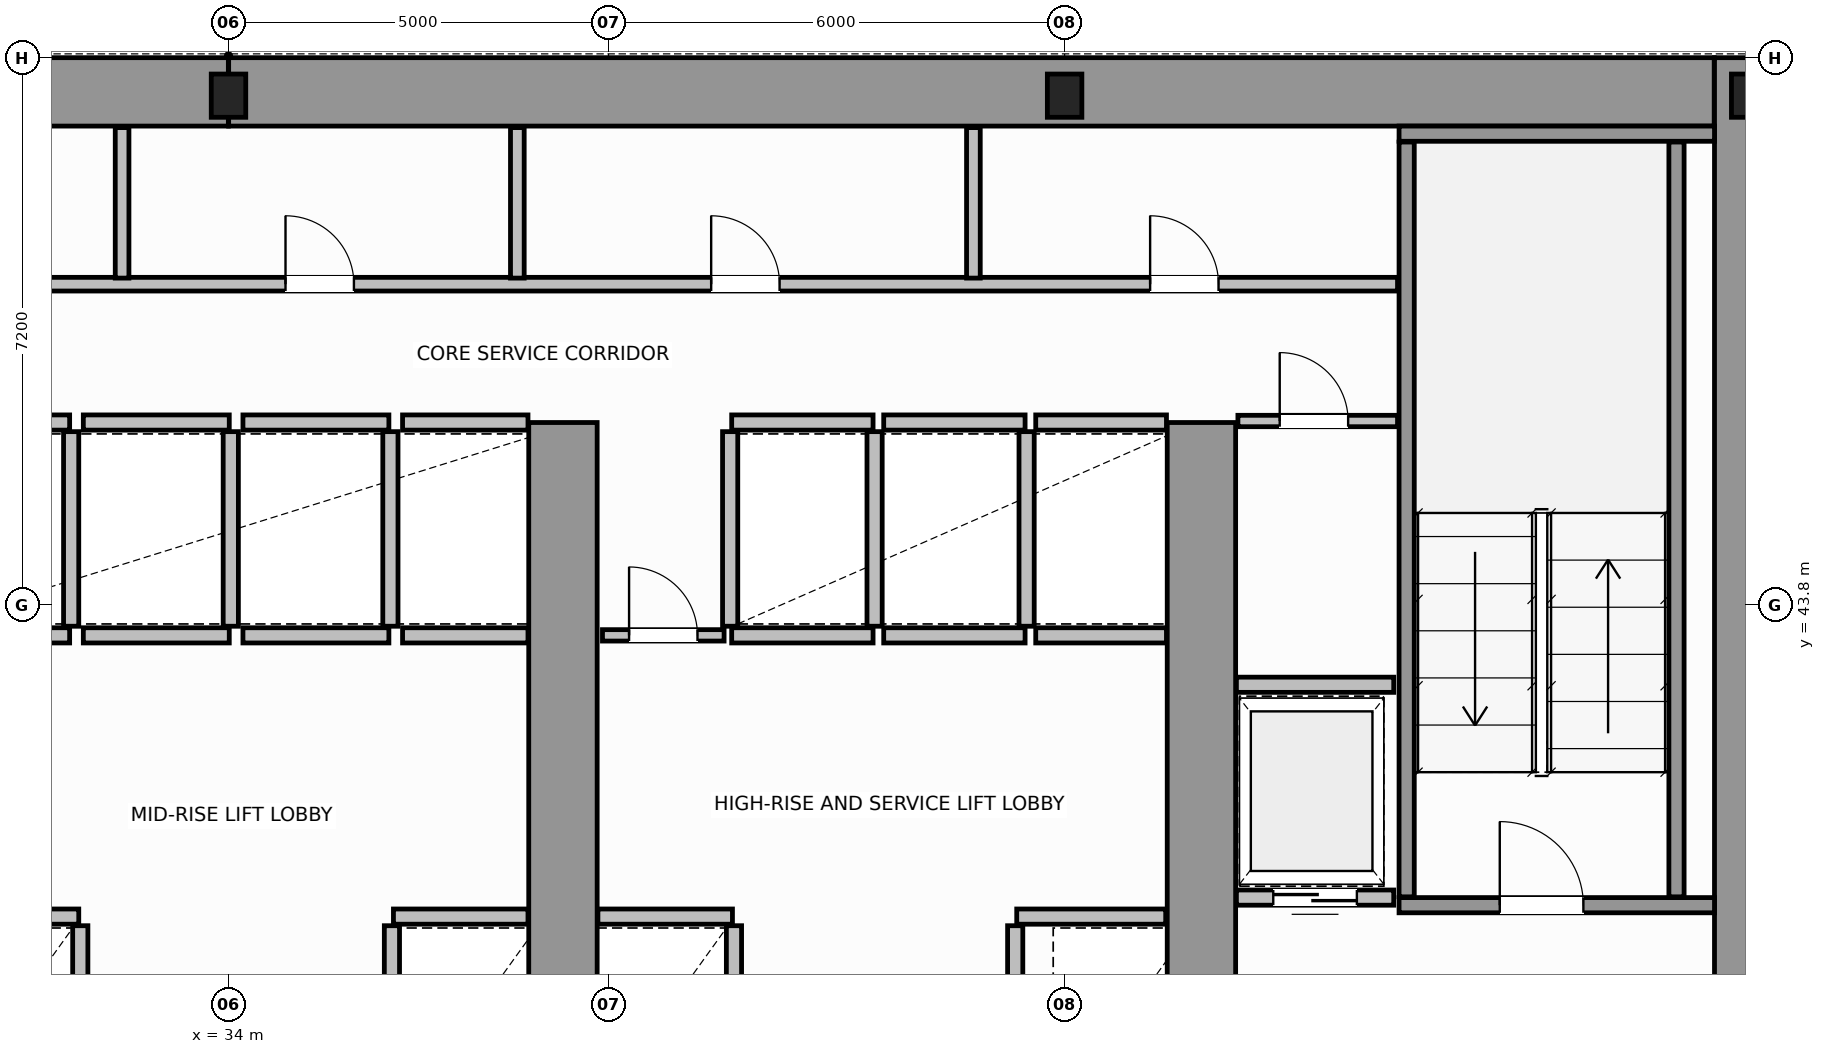
"""IFC4 building model, lengths in metres.
Left out: names, types, materials, properties, quantities, classifications, styles, units other than length and angle.
Written with IfcOpenShell. Run it as: python <this file> out.ifc"""

import sys

from ifc_helpers import new_model, si_unit, direction, frame, frame_2d, origin, origin_2d, place, context, subcontext, project, spatial, rectangle, i_section, extrude, source, transform, mapped, element, fill, save


model = new_model("IFC4")
c1 = context("Model", 3, precision=1e-05, world=origin(), true_north=direction((0.0, 1.0)))
c2 = subcontext(c1, "Body", "Model", "MODEL_VIEW")
j1 = project(units=[si_unit("LENGTHUNIT", "METRE"), si_unit("PLANEANGLEUNIT", "RADIAN")], contexts=[c1])
p1 = place(None, origin())
s1 = spatial("IfcSite", under=j1, at=p1, CompositionType="ELEMENT")
p2 = place(p1, origin())
s2 = spatial("IfcBuilding", under=s1, at=p2, CompositionType="ELEMENT")
p3 = place(p2, frame((0.0, 0.0, 49.2)))
s3 = spatial("IfcBuildingStorey", under=s2, at=p3, CompositionType="ELEMENT", Elevation=49.2)
m1 = source(origin(), c2, "Body", "SweptSolid", [
    extrude(i_section(OverallWidth=0.454, OverallDepth=0.569, WebThickness=0.078, FlangeThickness=0.08, FilletRadius=0.015, at=origin_2d()), origin(), (0.0, 0.0, 1.0), 3.8),
])
for number, where, z_axis, x_axis in (
    (1, (34.0, 50.5, 0.0), (0.0, 0.0, 1.0), (1.0, 0.0, 0.0)),
    (2, (45.0, 50.5, 0.0), (0.0, 0.0, 1.0), (1.0, 0.0, 0.0)),
    (3, (54.0, 50.5, 0.0), (0.0, 0.0, 1.0), (1.0, 0.0, 0.0)),
):
    element("IfcColumn", number, at=place(p3, frame(where, z_axis=z_axis, x_axis=x_axis)), inside=s3, PredefinedType="COLUMN", context=c2, shape_type="MappedRepresentation", body=[
        mapped(m1, transform((0.0, 0.0, 0.0), scale=1.0)),
    ])
for number, where, z_axis, x_axis in (
    (4, (14.454, 50.55, 0.0), (0.0, 0.0, 1.0), (1.0, 0.0, 0.0)),
    (5, (34.002, 50.55, 0.0), (0.0, 0.0, 1.0), (1.0, 0.0, 0.0)),
):
    element("IfcWall", number, at=place(p3, frame(where, z_axis=z_axis, x_axis=x_axis)), inside=s3, PredefinedType="SHEAR", context=c2, shape_type="SweptSolid", body=[
        extrude(rectangle(XDim=19.544, YDim=0.9, at=frame_2d((9.772, 0.0))), origin(), (0.0, 0.0, 1.0), 3.8),
    ])
p4 = place(p3, frame((54.0, 36.5, 0.0), z_axis=(0.0, 0.0, 1.0), x_axis=(0.0, 1.0, 0.0)))
e6 = element("IfcWall", 6, at=p4, inside=s3, PredefinedType="SHEAR", context=c2, shape_type="SweptSolid", body=[
    extrude(rectangle(XDim=14.5, YDim=0.9, at=frame_2d((7.25, 0.0))), origin(), (0.0, 0.0, 1.0), 3.8),
])
for number, where, z_axis, x_axis in (
    (7, (38.4, 36.97, 0.0), (0.0, 0.0, 1.0), (0.0, 1.0, 0.0)),
    (8, (46.8, 36.97, 0.0), (0.0, 0.0, 1.0), (0.0, 1.0, 0.0)),
):
    element("IfcWall", number, at=place(p3, frame(where, z_axis=z_axis, x_axis=x_axis)), inside=s3, PredefinedType="SHEAR", context=c2, shape_type="SweptSolid", body=[
        extrude(rectangle(XDim=9.23, YDim=0.9, at=frame_2d((4.615, 0.0))), origin(), (0.0, 0.0, 1.0), 3.8),
    ])
p5 = place(p3, frame((49.4, 39.85, 0.0), z_axis=(0.0, 0.0, 1.0), x_axis=(1.0, 0.0, 0.0)))
e9 = element("IfcWall", 9, at=p5, inside=s3, PredefinedType="SOLIDWALL", context=c2, shape_type="SweptSolid", body=[
    extrude(rectangle(XDim=4.15, YDim=0.2, at=frame_2d((2.075, 0.0))), origin(), (0.0, 0.0, 1.0), 3.8),
])
p6 = place(p5, frame((1.325, 0.0, 0.0)))
e10 = element("IfcOpeningElement", 10, at=p6, cuts=e9, PredefinedType="OPENING", context=c2, shape_type="SweptSolid", body=[
    extrude(rectangle(XDim=1.1, YDim=2.15, at=frame_2d((0.55, 1.075))), frame((0.0, 0.11, 0.0), z_axis=(0.0, -1.0, 0.0), x_axis=(1.0, 0.0, 0.0)), (0.0, 0.0, 1.0), 0.22),
])
p7 = place(p3, frame((49.4, 50.0, 0.0), z_axis=(0.0, 0.0, 1.0), x_axis=(1.0, 0.0, 0.0)))
e11 = element("IfcWall", 11, at=p7, inside=s3, PredefinedType="SOLIDWALL", context=c2, shape_type="SweptSolid", body=[
    extrude(rectangle(XDim=4.15, YDim=0.2, at=frame_2d((2.075, 0.0))), origin(), (0.0, 0.0, 1.0), 3.8),
])
for number, where, z_axis, x_axis in (
    (12, (49.5, 39.96, 0.0), (0.0, 0.0, 1.0), (0.0, 1.0, 0.0)),
    (13, (53.05, 39.96, 0.0), (0.0, 0.0, 1.0), (0.0, 1.0, 0.0)),
):
    element("IfcWall", number, at=place(p3, frame(where, z_axis=z_axis, x_axis=x_axis)), inside=s3, PredefinedType="SOLIDWALL", context=c2, shape_type="SweptSolid", body=[
        extrude(rectangle(XDim=9.93, YDim=0.2, at=frame_2d((4.965, 0.0))), origin(), (0.0, 0.0, 1.0), 3.8),
    ])
p8 = place(p3, frame((30.26, 39.7, 0.0), z_axis=(0.0, 0.0, 1.0), x_axis=(1.0, 0.0, 0.0)))
e14 = element("IfcWall", 14, at=p8, inside=s3, PredefinedType="SOLIDWALL", context=c2, shape_type="SweptSolid", body=[
    extrude(rectangle(XDim=1.77, YDim=0.2, at=frame_2d((0.885, 0.0))), origin(), (0.0, 0.0, 1.0), 3.58),
])
p9 = place(p3, frame((32.05, 37.02, 0.0), z_axis=(0.0, 0.0, 1.0), x_axis=(0.0, 1.0, 0.0)))
e15 = element("IfcWall", 15, at=p9, inside=s3, PredefinedType="SOLIDWALL", context=c2, shape_type="SweptSolid", body=[
    extrude(rectangle(XDim=2.56, YDim=0.2, at=frame_2d((1.28, 0.0))), origin(), (0.0, 0.0, 1.0), 3.58),
])
p10 = place(p3, frame((36.17, 39.7, 0.0), z_axis=(0.0, 0.0, 1.0), x_axis=(1.0, 0.0, 0.0)))
e16 = element("IfcWall", 16, at=p10, inside=s3, PredefinedType="SOLIDWALL", context=c2, shape_type="SweptSolid", body=[
    extrude(rectangle(XDim=1.77, YDim=0.2, at=frame_2d((0.885, 0.0))), origin(), (0.0, 0.0, 1.0), 3.58),
])
p11 = place(p3, frame((36.15, 37.02, 0.0), z_axis=(0.0, 0.0, 1.0), x_axis=(0.0, 1.0, 0.0)))
e17 = element("IfcWall", 17, at=p11, inside=s3, PredefinedType="SOLIDWALL", context=c2, shape_type="SweptSolid", body=[
    extrude(rectangle(XDim=2.56, YDim=0.2, at=frame_2d((1.28, 0.0))), origin(), (0.0, 0.0, 1.0), 3.58),
])
for number, where, z_axis, x_axis in (
    (18, (30.26, 43.4, 0.0), (0.0, 0.0, 1.0), (1.0, 0.0, 0.0)),
    (19, (30.26, 46.2, 0.0), (0.0, 0.0, 1.0), (1.0, 0.0, 0.0)),
):
    element("IfcWall", number, at=place(p3, frame(where, z_axis=z_axis, x_axis=x_axis)), inside=s3, PredefinedType="SOLIDWALL", context=c2, shape_type="SweptSolid", body=[
        extrude(rectangle(XDim=1.65, YDim=0.2, at=frame_2d((0.825, 0.0))), origin(), (0.0, 0.0, 1.0), 3.58),
    ])
p12 = place(p3, frame((31.93, 43.52, 0.0), z_axis=(0.0, 0.0, 1.0), x_axis=(0.0, 1.0, 0.0)))
e20 = element("IfcWall", 20, at=p12, inside=s3, PredefinedType="SOLIDWALL", context=c2, shape_type="SweptSolid", body=[
    extrude(rectangle(XDim=2.56, YDim=0.2, at=frame_2d((1.28, 0.0))), origin(), (0.0, 0.0, 1.0), 3.58),
])
for number, where, z_axis, x_axis in (
    (21, (32.09, 43.4, 0.0), (0.0, 0.0, 1.0), (1.0, 0.0, 0.0)),
    (22, (32.09, 46.2, 0.0), (0.0, 0.0, 1.0), (1.0, 0.0, 0.0)),
):
    element("IfcWall", number, at=place(p3, frame(where, z_axis=z_axis, x_axis=x_axis)), inside=s3, PredefinedType="SOLIDWALL", context=c2, shape_type="SweptSolid", body=[
        extrude(rectangle(XDim=1.92, YDim=0.2, at=frame_2d((0.96, 0.0))), origin(), (0.0, 0.0, 1.0), 3.58),
    ])
p13 = place(p3, frame((34.03, 43.52, 0.0), z_axis=(0.0, 0.0, 1.0), x_axis=(0.0, 1.0, 0.0)))
e23 = element("IfcWall", 23, at=p13, inside=s3, PredefinedType="SOLIDWALL", context=c2, shape_type="SweptSolid", body=[
    extrude(rectangle(XDim=2.56, YDim=0.2, at=frame_2d((1.28, 0.0))), origin(), (0.0, 0.0, 1.0), 3.58),
])
for number, where, z_axis, x_axis in (
    (24, (34.19, 43.4, 0.0), (0.0, 0.0, 1.0), (1.0, 0.0, 0.0)),
    (25, (34.19, 46.2, 0.0), (0.0, 0.0, 1.0), (1.0, 0.0, 0.0)),
):
    element("IfcWall", number, at=place(p3, frame(where, z_axis=z_axis, x_axis=x_axis)), inside=s3, PredefinedType="SOLIDWALL", context=c2, shape_type="SweptSolid", body=[
        extrude(rectangle(XDim=1.92, YDim=0.2, at=frame_2d((0.96, 0.0))), origin(), (0.0, 0.0, 1.0), 3.58),
    ])
p14 = place(p3, frame((36.13, 43.52, 0.0), z_axis=(0.0, 0.0, 1.0), x_axis=(0.0, 1.0, 0.0)))
e26 = element("IfcWall", 26, at=p14, inside=s3, PredefinedType="SOLIDWALL", context=c2, shape_type="SweptSolid", body=[
    extrude(rectangle(XDim=2.56, YDim=0.2, at=frame_2d((1.28, 0.0))), origin(), (0.0, 0.0, 1.0), 3.58),
])
for number, where, z_axis, x_axis in (
    (27, (36.29, 43.4, 0.0), (0.0, 0.0, 1.0), (1.0, 0.0, 0.0)),
    (28, (36.29, 46.2, 0.0), (0.0, 0.0, 1.0), (1.0, 0.0, 0.0)),
):
    element("IfcWall", number, at=place(p3, frame(where, z_axis=z_axis, x_axis=x_axis)), inside=s3, PredefinedType="SOLIDWALL", context=c2, shape_type="SweptSolid", body=[
        extrude(rectangle(XDim=1.65, YDim=0.2, at=frame_2d((0.825, 0.0))), origin(), (0.0, 0.0, 1.0), 3.58),
    ])
p15 = place(p3, frame((38.86, 39.7, 0.0), z_axis=(0.0, 0.0, 1.0), x_axis=(1.0, 0.0, 0.0)))
e29 = element("IfcWall", 29, at=p15, inside=s3, PredefinedType="SOLIDWALL", context=c2, shape_type="SweptSolid", body=[
    extrude(rectangle(XDim=1.77, YDim=0.2, at=frame_2d((0.885, 0.0))), origin(), (0.0, 0.0, 1.0), 3.58),
])
p16 = place(p3, frame((40.65, 37.02, 0.0), z_axis=(0.0, 0.0, 1.0), x_axis=(0.0, 1.0, 0.0)))
e30 = element("IfcWall", 30, at=p16, inside=s3, PredefinedType="SOLIDWALL", context=c2, shape_type="SweptSolid", body=[
    extrude(rectangle(XDim=2.56, YDim=0.2, at=frame_2d((1.28, 0.0))), origin(), (0.0, 0.0, 1.0), 3.58),
])
p17 = place(p3, frame((44.37, 39.7, 0.0), z_axis=(0.0, 0.0, 1.0), x_axis=(1.0, 0.0, 0.0)))
e31 = element("IfcWall", 31, at=p17, inside=s3, PredefinedType="SOLIDWALL", context=c2, shape_type="SweptSolid", body=[
    extrude(rectangle(XDim=1.96, YDim=0.2, at=frame_2d((0.98, 0.0))), origin(), (0.0, 0.0, 1.0), 3.58),
])
p18 = place(p3, frame((44.35, 37.02, 0.0), z_axis=(0.0, 0.0, 1.0), x_axis=(0.0, 1.0, 0.0)))
e32 = element("IfcWall", 32, at=p18, inside=s3, PredefinedType="SOLIDWALL", context=c2, shape_type="SweptSolid", body=[
    extrude(rectangle(XDim=2.56, YDim=0.2, at=frame_2d((1.28, 0.0))), origin(), (0.0, 0.0, 1.0), 3.58),
])
for number, where, z_axis, x_axis in (
    (33, (40.62, 43.4, 0.0), (0.0, 0.0, 1.0), (1.0, 0.0, 0.0)),
    (34, (40.62, 46.2, 0.0), (0.0, 0.0, 1.0), (1.0, 0.0, 0.0)),
):
    element("IfcWall", number, at=place(p3, frame(where, z_axis=z_axis, x_axis=x_axis)), inside=s3, PredefinedType="SOLIDWALL", context=c2, shape_type="SweptSolid", body=[
        extrude(rectangle(XDim=1.86, YDim=0.2, at=frame_2d((0.93, 0.0))), origin(), (0.0, 0.0, 1.0), 3.58),
    ])
for number, where, z_axis, x_axis in (
    (35, (40.6, 43.52, 0.0), (0.0, 0.0, 1.0), (0.0, 1.0, 0.0)),
    (36, (42.5, 43.52, 0.0), (0.0, 0.0, 1.0), (0.0, 1.0, 0.0)),
):
    element("IfcWall", number, at=place(p3, frame(where, z_axis=z_axis, x_axis=x_axis)), inside=s3, PredefinedType="SOLIDWALL", context=c2, shape_type="SweptSolid", body=[
        extrude(rectangle(XDim=2.56, YDim=0.2, at=frame_2d((1.28, 0.0))), origin(), (0.0, 0.0, 1.0), 3.58),
    ])
for number, where, z_axis, x_axis in (
    (37, (42.62, 43.4, 0.0), (0.0, 0.0, 1.0), (1.0, 0.0, 0.0)),
    (38, (42.62, 46.2, 0.0), (0.0, 0.0, 1.0), (1.0, 0.0, 0.0)),
):
    element("IfcWall", number, at=place(p3, frame(where, z_axis=z_axis, x_axis=x_axis)), inside=s3, PredefinedType="SOLIDWALL", context=c2, shape_type="SweptSolid", body=[
        extrude(rectangle(XDim=1.86, YDim=0.2, at=frame_2d((0.93, 0.0))), origin(), (0.0, 0.0, 1.0), 3.58),
    ])
p19 = place(p3, frame((44.5, 43.52, 0.0), z_axis=(0.0, 0.0, 1.0), x_axis=(0.0, 1.0, 0.0)))
e39 = element("IfcWall", 39, at=p19, inside=s3, PredefinedType="SOLIDWALL", context=c2, shape_type="SweptSolid", body=[
    extrude(rectangle(XDim=2.56, YDim=0.2, at=frame_2d((1.28, 0.0))), origin(), (0.0, 0.0, 1.0), 3.58),
])
for number, where, z_axis, x_axis in (
    (40, (44.62, 43.4, 0.0), (0.0, 0.0, 1.0), (1.0, 0.0, 0.0)),
    (41, (44.62, 46.2, 0.0), (0.0, 0.0, 1.0), (1.0, 0.0, 0.0)),
):
    element("IfcWall", number, at=place(p3, frame(where, z_axis=z_axis, x_axis=x_axis)), inside=s3, PredefinedType="SOLIDWALL", context=c2, shape_type="SweptSolid", body=[
        extrude(rectangle(XDim=1.72, YDim=0.2, at=frame_2d((0.86, 0.0))), origin(), (0.0, 0.0, 1.0), 3.58),
    ])
p20 = place(p3, frame((47.26, 39.95, 0.0), z_axis=(0.0, 0.0, 1.0), x_axis=(1.0, 0.0, 0.0)))
e42 = element("IfcWall", 42, at=p20, inside=s3, PredefinedType="SOLIDWALL", context=c2, shape_type="SweptSolid", body=[
    extrude(rectangle(XDim=2.07, YDim=0.2, at=frame_2d((1.035, 0.0))), origin(), (0.0, 0.0, 1.0), 3.58),
])
p21 = place(p20, frame((0.485, 0.0, 0.0)))
e43 = element("IfcOpeningElement", 43, at=p21, cuts=e42, PredefinedType="OPENING", context=c2, shape_type="SweptSolid", body=[
    extrude(rectangle(XDim=1.1, YDim=2.15, at=frame_2d((0.55, 1.075))), frame((0.0, 0.11, 0.0), z_axis=(0.0, -1.0, 0.0), x_axis=(1.0, 0.0, 0.0)), (0.0, 0.0, 1.0), 0.22),
])
p22 = place(p3, frame((47.26, 42.75, 0.0), z_axis=(0.0, 0.0, 1.0), x_axis=(1.0, 0.0, 0.0)))
e44 = element("IfcWall", 44, at=p22, inside=s3, PredefinedType="SOLIDWALL", context=c2, shape_type="SweptSolid", body=[
    extrude(rectangle(XDim=2.07, YDim=0.2, at=frame_2d((1.035, 0.0))), origin(), (0.0, 0.0, 1.0), 3.58),
])
p23 = place(p3, frame((47.28, 46.22, 0.0), z_axis=(0.0, 0.0, 1.0), x_axis=(1.0, 0.0, 0.0)))
e45 = element("IfcWall", 45, at=p23, inside=s3, PredefinedType="PARTITIONING", context=c2, shape_type="SweptSolid", body=[
    extrude(rectangle(XDim=2.1, YDim=0.15, at=frame_2d((1.05, 0.0))), origin(), (0.0, 0.0, 1.0), 3.58),
])
p24 = place(p23, frame((0.55, 0.0, 0.0)))
e46 = element("IfcOpeningElement", 46, at=p24, cuts=e45, PredefinedType="OPENING", context=c2, shape_type="SweptSolid", body=[
    extrude(rectangle(XDim=0.9, YDim=2.1, at=frame_2d((0.45, 1.05))), frame((0.0, 0.085, 0.0), z_axis=(0.0, -1.0, 0.0), x_axis=(1.0, 0.0, 0.0)), (0.0, 0.0, 1.0), 0.17),
])
p25 = place(p3, frame((38.92, 43.4, 0.0), z_axis=(0.0, 0.0, 1.0), x_axis=(1.0, 0.0, 0.0)))
e47 = element("IfcWall", 47, at=p25, inside=s3, PredefinedType="PARTITIONING", context=c2, shape_type="SweptSolid", body=[
    extrude(rectangle(XDim=1.6, YDim=0.15, at=frame_2d((0.8, 0.0))), origin(), (0.0, 0.0, 1.0), 3.58),
])
p26 = place(p25, frame((0.35, 0.0, 0.0)))
e48 = element("IfcOpeningElement", 48, at=p26, cuts=e47, PredefinedType="OPENING", context=c2, shape_type="SweptSolid", body=[
    extrude(rectangle(XDim=0.9, YDim=2.1, at=frame_2d((0.45, 1.05))), frame((0.0, 0.085, 0.0), z_axis=(0.0, -1.0, 0.0), x_axis=(1.0, 0.0, 0.0)), (0.0, 0.0, 1.0), 0.17),
])
p27 = place(p3, frame((18.62, 48.02, 0.0), z_axis=(0.0, 0.0, 1.0), x_axis=(1.0, 0.0, 0.0)))
e49 = element("IfcWall", 49, at=p27, inside=s3, PredefinedType="PLUMBINGWALL", context=c2, shape_type="SweptSolid", body=[
    extrude(rectangle(XDim=30.76, YDim=0.18, at=frame_2d((15.38, 0.0))), origin(), (0.0, 0.0, 1.0), 3.58),
])
p28 = place(p27, frame((1.655, 0.0, 0.0)))
e50 = element("IfcOpeningElement", 50, at=p28, cuts=e49, PredefinedType="OPENING", context=c2, shape_type="SweptSolid", body=[
    extrude(rectangle(XDim=0.9, YDim=2.15, at=frame_2d((0.45, 1.075))), frame((0.0, 0.1, 0.0), z_axis=(0.0, -1.0, 0.0), x_axis=(1.0, 0.0, 0.0)), (0.0, 0.0, 1.0), 0.2),
])
p29 = place(p27, frame((6.03, 0.0, 0.0)))
e51 = element("IfcOpeningElement", 51, at=p29, cuts=e49, PredefinedType="OPENING", context=c2, shape_type="SweptSolid", body=[
    extrude(rectangle(XDim=0.9, YDim=2.15, at=frame_2d((0.45, 1.075))), frame((0.0, 0.1, 0.0), z_axis=(0.0, -1.0, 0.0), x_axis=(1.0, 0.0, 0.0)), (0.0, 0.0, 1.0), 0.2),
])
p30 = place(p27, frame((10.93, 0.0, 0.0)))
e52 = element("IfcOpeningElement", 52, at=p30, cuts=e49, PredefinedType="OPENING", context=c2, shape_type="SweptSolid", body=[
    extrude(rectangle(XDim=0.9, YDim=2.15, at=frame_2d((0.45, 1.075))), frame((0.0, 0.1, 0.0), z_axis=(0.0, -1.0, 0.0), x_axis=(1.0, 0.0, 0.0)), (0.0, 0.0, 1.0), 0.2),
])
p31 = place(p27, frame((16.13, 0.0, 0.0)))
e53 = element("IfcOpeningElement", 53, at=p31, cuts=e49, PredefinedType="OPENING", context=c2, shape_type="SweptSolid", body=[
    extrude(rectangle(XDim=0.9, YDim=2.15, at=frame_2d((0.45, 1.075))), frame((0.0, 0.1, 0.0), z_axis=(0.0, -1.0, 0.0), x_axis=(1.0, 0.0, 0.0)), (0.0, 0.0, 1.0), 0.2),
])
p32 = place(p27, frame((21.73, 0.0, 0.0)))
e54 = element("IfcOpeningElement", 54, at=p32, cuts=e49, PredefinedType="OPENING", context=c2, shape_type="SweptSolid", body=[
    extrude(rectangle(XDim=0.9, YDim=2.15, at=frame_2d((0.45, 1.075))), frame((0.0, 0.1, 0.0), z_axis=(0.0, -1.0, 0.0), x_axis=(1.0, 0.0, 0.0)), (0.0, 0.0, 1.0), 0.2),
])
p33 = place(p27, frame((27.505, 0.0, 0.0)))
e55 = element("IfcOpeningElement", 55, at=p33, cuts=e49, PredefinedType="OPENING", context=c2, shape_type="SweptSolid", body=[
    extrude(rectangle(XDim=0.9, YDim=2.15, at=frame_2d((0.45, 1.075))), frame((0.0, 0.1, 0.0), z_axis=(0.0, -1.0, 0.0), x_axis=(1.0, 0.0, 0.0)), (0.0, 0.0, 1.0), 0.2),
])
for number, where, z_axis, x_axis in (
    (56, (32.6, 48.1, 0.0), (0.0, 0.0, 1.0), (0.0, 1.0, 0.0)),
    (57, (37.8, 48.1, 0.0), (0.0, 0.0, 1.0), (0.0, 1.0, 0.0)),
    (58, (43.8, 48.1, 0.0), (0.0, 0.0, 1.0), (0.0, 1.0, 0.0)),
):
    element("IfcWall", number, at=place(p3, frame(where, z_axis=z_axis, x_axis=x_axis)), inside=s3, PredefinedType="PLUMBINGWALL", context=c2, shape_type="SweptSolid", body=[
        extrude(rectangle(XDim=1.98, YDim=0.18, at=frame_2d((0.99, 0.0))), origin(), (0.0, 0.0, 1.0), 3.58),
    ])
m2 = source(origin(), c2, "Body", "SweptSolid", [
    extrude(rectangle(XDim=1.1, YDim=2.15, at=frame_2d((0.55, 1.075))), frame((0.0, 0.025, 0.0), z_axis=(0.0, -1.0, 0.0), x_axis=(1.0, 0.0, 0.0)), (0.0, 0.0, 1.0), 0.05),
])
p34 = place(p6, origin())
e59 = element("IfcDoor", 59, at=p34, inside=s3, OperationType="SINGLE_SWING_RIGHT", PredefinedType="DOOR", context=c2, shape_type="MappedRepresentation", body=[
    mapped(m2, transform((0.0, 0.0, 0.0), scale=1.0)),
])
fill(e10, e59)
p35 = place(p21, origin())
e60 = element("IfcDoor", 60, at=p35, inside=s3, OperationType="DOUBLE_DOOR_SLIDING", PredefinedType="DOOR", context=c2, shape_type="MappedRepresentation", body=[
    mapped(m2, transform((0.0, 0.0, 0.0), scale=1.0)),
])
fill(e43, e60)
m3 = source(origin(), c2, "Body", "SweptSolid", [
    extrude(rectangle(XDim=0.9, YDim=2.1, at=frame_2d((0.45, 1.05))), frame((0.0, 0.025, 0.0), z_axis=(0.0, -1.0, 0.0), x_axis=(1.0, 0.0, 0.0)), (0.0, 0.0, 1.0), 0.05),
])
p36 = place(p24, origin())
e61 = element("IfcDoor", 61, at=p36, inside=s3, OperationType="SINGLE_SWING_RIGHT", PredefinedType="DOOR", context=c2, shape_type="MappedRepresentation", body=[
    mapped(m3, transform((0.0, 0.0, 0.0), scale=1.0)),
])
fill(e46, e61)
p37 = place(p26, origin())
e62 = element("IfcDoor", 62, at=p37, inside=s3, OperationType="SINGLE_SWING_LEFT", PredefinedType="DOOR", context=c2, shape_type="MappedRepresentation", body=[
    mapped(m3, transform((0.0, 0.0, 0.0), scale=1.0)),
])
fill(e48, e62)
m4 = source(origin(), c2, "Body", "SweptSolid", [
    extrude(rectangle(XDim=0.9, YDim=2.15, at=frame_2d((0.45, 1.075))), frame((0.0, 0.025, 0.0), z_axis=(0.0, -1.0, 0.0), x_axis=(1.0, 0.0, 0.0)), (0.0, 0.0, 1.0), 0.05),
])
p38 = place(p31, origin())
e63 = element("IfcDoor", 63, at=p38, inside=s3, OperationType="SINGLE_SWING_RIGHT", PredefinedType="DOOR", context=c2, shape_type="MappedRepresentation", body=[
    mapped(m4, transform((0.0, 0.0, 0.0), scale=1.0)),
])
fill(e53, e63)
p39 = place(p32, origin())
e64 = element("IfcDoor", 64, at=p39, inside=s3, OperationType="SINGLE_SWING_LEFT", PredefinedType="DOOR", context=c2, shape_type="MappedRepresentation", body=[
    mapped(m4, transform((0.0, 0.0, 0.0), scale=1.0)),
])
fill(e54, e64)
p40 = place(p33, origin())
e65 = element("IfcDoor", 65, at=p40, inside=s3, OperationType="SINGLE_SWING_RIGHT", PredefinedType="DOOR", context=c2, shape_type="MappedRepresentation", body=[
    mapped(m4, transform((0.0, 0.0, 0.0), scale=1.0)),
])
fill(e55, e65)
save(model, sys.argv[1])
